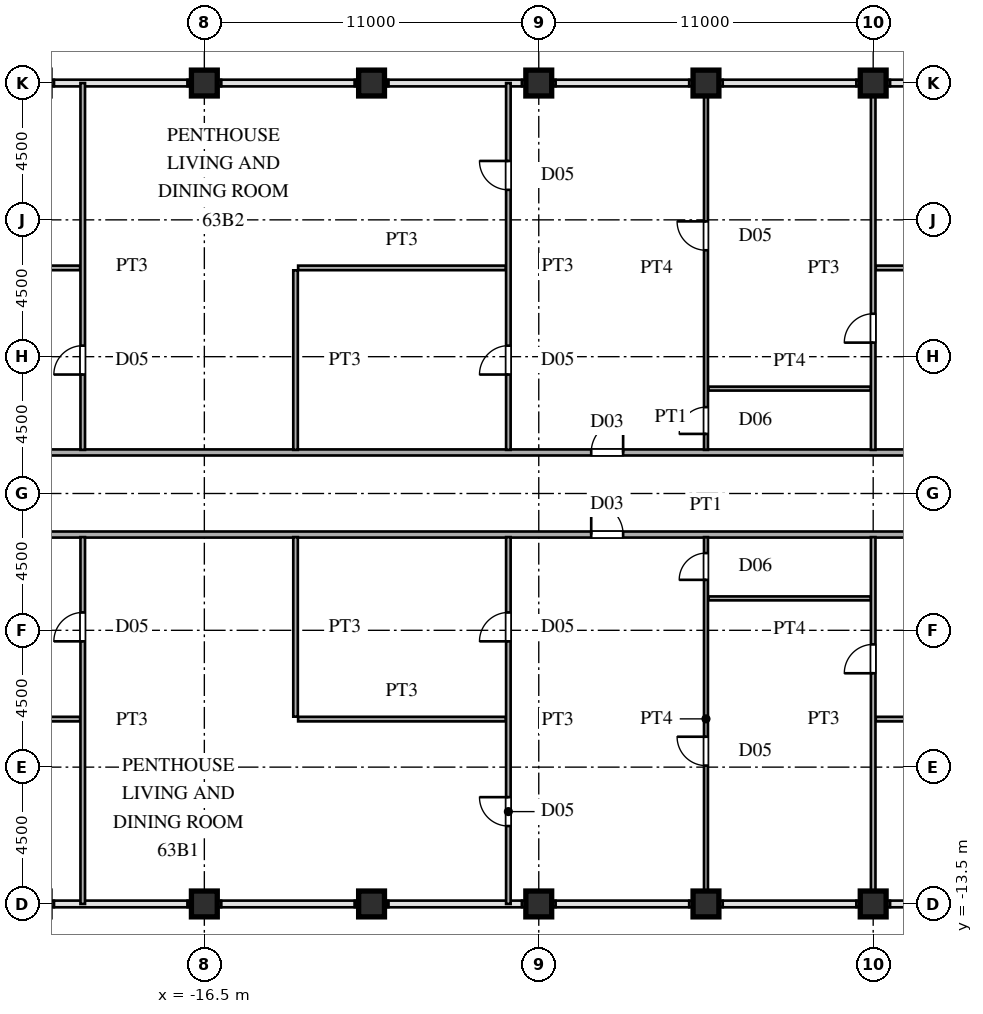
"""IFC4 building model, lengths in metres.
Left out: names, types, materials, properties, quantities, classifications, styles, units other than length and angle.
Written with IfcOpenShell. Run it as: python <this file> out.ifc"""

import sys

from ifc_helpers import new_model, si_unit, direction, frame, frame_2d, origin, origin_2d, place, context, subcontext, project, spatial, rectangle, hollow_rectangle, extrude, source, transform, mapped, element, fill, save


model = new_model("IFC4")
c1 = context("Model", 3, precision=1e-05, world=origin(), true_north=direction((0.0, 1.0)))
c2 = subcontext(c1, "Body", "Model", "MODEL_VIEW")
j1 = project(units=[si_unit("LENGTHUNIT", "METRE"), si_unit("PLANEANGLEUNIT", "RADIAN")], contexts=[c1])
p1 = place(None, origin())
s1 = spatial("IfcSite", under=j1, at=p1, CompositionType="ELEMENT")
p2 = place(p1, origin())
s2 = spatial("IfcBuilding", under=s1, at=p2, CompositionType="ELEMENT")
p3 = place(p2, frame((0.0, 0.0, 239.4)))
s3 = spatial("IfcBuildingStorey", under=s2, at=p3, CompositionType="ELEMENT", Elevation=239.4)
m1 = source(origin(), c2, "Body", "SweptSolid", [
    extrude(hollow_rectangle(XDim=0.85, YDim=0.85, WallThickness=0.036, at=origin_2d()), origin(), (0.0, 0.0, 1.0), 3.75),
])
for number, where, z_axis, x_axis in (
    (1, (-16.5, -13.5, 0.0), (0.0, 0.0, 1.0), (1.0, 0.0, 0.0)),
    (2, (-16.5, 13.5, 0.0), (0.0, 0.0, 1.0), (1.0, 0.0, 0.0)),
    (3, (-11.0, -13.5, 0.0), (0.0, 0.0, 1.0), (1.0, 0.0, 0.0)),
    (4, (-11.0, 13.5, 0.0), (0.0, 0.0, 1.0), (1.0, 0.0, 0.0)),
    (5, (-5.5, -13.5, 0.0), (0.0, 0.0, 1.0), (1.0, 0.0, 0.0)),
    (6, (-5.5, 13.5, 0.0), (0.0, 0.0, 1.0), (1.0, 0.0, 0.0)),
    (7, (0.0, -13.5, 0.0), (0.0, 0.0, 1.0), (1.0, 0.0, 0.0)),
    (8, (0.0, 13.5, 0.0), (0.0, 0.0, 1.0), (1.0, 0.0, 0.0)),
    (9, (5.5, -13.5, 0.0), (0.0, 0.0, 1.0), (1.0, 0.0, 0.0)),
    (10, (5.5, 13.5, 0.0), (0.0, 0.0, 1.0), (1.0, 0.0, 0.0)),
):
    element("IfcColumn", number, at=place(p3, frame(where, z_axis=z_axis, x_axis=x_axis)), inside=s3, PredefinedType="COLUMN", context=c2, shape_type="MappedRepresentation", body=[
        mapped(m1, transform((0.0, 0.0, 0.0), scale=1.0)),
    ])
for number, where, z_axis, x_axis in (
    (11, (-22.55, -13.5, 0.0), (0.0, 0.0, 1.0), (1.0, 0.0, 0.0)),
    (12, (-22.55, 13.5, 0.0), (0.0, 0.0, 1.0), (1.0, 0.0, 0.0)),
    (13, (-17.05, -13.5, 0.0), (0.0, 0.0, 1.0), (1.0, 0.0, 0.0)),
    (14, (-17.05, 13.5, 0.0), (0.0, 0.0, 1.0), (1.0, 0.0, 0.0)),
    (15, (-11.55, -13.5, 0.0), (0.0, 0.0, 1.0), (1.0, 0.0, 0.0)),
    (16, (-11.55, 13.5, 0.0), (0.0, 0.0, 1.0), (1.0, 0.0, 0.0)),
    (17, (-6.05, -13.5, 0.0), (0.0, 0.0, 1.0), (1.0, 0.0, 0.0)),
    (18, (-6.05, 13.5, 0.0), (0.0, 0.0, 1.0), (1.0, 0.0, 0.0)),
    (19, (-0.55, -13.5, 0.0), (0.0, 0.0, 1.0), (1.0, 0.0, 0.0)),
    (20, (-0.55, 13.5, 0.0), (0.0, 0.0, 1.0), (1.0, 0.0, 0.0)),
    (21, (4.95, -13.5, 0.0), (0.0, 0.0, 1.0), (1.0, 0.0, 0.0)),
    (22, (4.95, 13.5, 0.0), (0.0, 0.0, 1.0), (1.0, 0.0, 0.0)),
):
    element("IfcWall", number, at=place(p3, frame(where, z_axis=z_axis, x_axis=x_axis)), inside=s3, PredefinedType="SOLIDWALL", context=c2, shape_type="SweptSolid", body=[
        extrude(rectangle(XDim=1.1, YDim=0.21, at=frame_2d((0.55, 0.0))), origin(), (0.0, 0.0, 1.0), 3.03),
    ])
p4 = place(p3, frame((-27.245, -7.42, 0.0), z_axis=(0.0, 0.0, 1.0), x_axis=(1.0, 0.0, 0.0)))
e23 = element("IfcWall", 23, at=p4, inside=s3, PredefinedType="PARTITIONING", context=c2, shape_type="SweptSolid", body=[
    extrude(rectangle(XDim=6.66, YDim=0.15, at=frame_2d((3.33, 0.0))), origin(), (0.0, 0.0, 1.0), 3.53),
])
p5 = place(p4, frame((3.07, 0.0, 0.0)))
e24 = element("IfcOpeningElement", 24, at=p5, cuts=e23, PredefinedType="OPENING", context=c2, shape_type="SweptSolid", body=[
    extrude(rectangle(XDim=0.95, YDim=2.15, at=frame_2d((0.475, 1.075))), frame((0.0, 0.085, 0.0), z_axis=(0.0, -1.0, 0.0), x_axis=(1.0, 0.0, 0.0)), (0.0, 0.0, 1.0), 0.17),
])
p6 = place(p3, frame((-13.415, -7.42, 0.0), z_axis=(0.0, 0.0, 1.0), x_axis=(1.0, 0.0, 0.0)))
e25 = element("IfcWall", 25, at=p6, inside=s3, PredefinedType="PARTITIONING", context=c2, shape_type="SweptSolid", body=[
    extrude(rectangle(XDim=6.83, YDim=0.15, at=frame_2d((3.415, 0.0))), origin(), (0.0, 0.0, 1.0), 3.53),
])
p7 = place(p3, frame((5.585, -7.42, 0.0), z_axis=(0.0, 0.0, 1.0), x_axis=(1.0, 0.0, 0.0)))
e26 = element("IfcWall", 26, at=p7, inside=s3, PredefinedType="PARTITIONING", context=c2, shape_type="SweptSolid", body=[
    extrude(rectangle(XDim=21.66, YDim=0.15, at=frame_2d((10.83, 0.0))), origin(), (0.0, 0.0, 1.0), 3.53),
])
p8 = place(p7, frame((3.94, 0.0, 0.0)))
e27 = element("IfcOpeningElement", 27, at=p8, cuts=e26, PredefinedType="OPENING", context=c2, shape_type="SweptSolid", body=[
    extrude(rectangle(XDim=0.95, YDim=2.15, at=frame_2d((0.475, 1.075))), frame((0.0, 0.085, 0.0), z_axis=(0.0, -1.0, 0.0), x_axis=(1.0, 0.0, 0.0)), (0.0, 0.0, 1.0), 0.17),
])
p9 = place(p7, frame((11.69, 0.0, 0.0)))
e28 = element("IfcOpeningElement", 28, at=p9, cuts=e26, PredefinedType="OPENING", context=c2, shape_type="SweptSolid", body=[
    extrude(rectangle(XDim=0.95, YDim=2.15, at=frame_2d((0.475, 1.075))), frame((0.0, 0.085, 0.0), z_axis=(0.0, -1.0, 0.0), x_axis=(1.0, 0.0, 0.0)), (0.0, 0.0, 1.0), 0.17),
])
p10 = place(p7, frame((18.19, 0.0, 0.0)))
e29 = element("IfcOpeningElement", 29, at=p10, cuts=e26, PredefinedType="OPENING", context=c2, shape_type="SweptSolid", body=[
    extrude(rectangle(XDim=0.95, YDim=2.15, at=frame_2d((0.475, 1.075))), frame((0.0, 0.085, 0.0), z_axis=(0.0, -1.0, 0.0), x_axis=(1.0, 0.0, 0.0)), (0.0, 0.0, 1.0), 0.17),
])
p11 = place(p3, frame((0.085, -3.45, 0.0), z_axis=(0.0, 0.0, 1.0), x_axis=(1.0, 0.0, 0.0)))
e30 = element("IfcWall", 30, at=p11, inside=s3, PredefinedType="PARTITIONING", context=c2, shape_type="SweptSolid", body=[
    extrude(rectangle(XDim=5.33, YDim=0.13, at=frame_2d((2.665, 0.0))), origin(), (0.0, 0.0, 1.0), 3.53),
])
p12 = place(p3, frame((-27.245, -1.35, 0.0), z_axis=(0.0, 0.0, 1.0), x_axis=(1.0, 0.0, 0.0)))
e31 = element("IfcWall", 31, at=p12, inside=s3, PredefinedType="PARTITIONING", context=c2, shape_type="SweptSolid", body=[
    extrude(rectangle(XDim=54.49, YDim=0.2, at=frame_2d((27.245, 0.0))), origin(), (0.0, 0.0, 1.0), 3.53),
])
p13 = place(p12, frame((23.47, 0.0, 0.0)))
e32 = element("IfcOpeningElement", 32, at=p13, cuts=e31, PredefinedType="OPENING", context=c2, shape_type="SweptSolid", body=[
    extrude(rectangle(XDim=1.05, YDim=2.25, at=frame_2d((0.525, 1.125))), frame((0.0, 0.11, 0.0), z_axis=(0.0, -1.0, 0.0), x_axis=(1.0, 0.0, 0.0)), (0.0, 0.0, 1.0), 0.22),
])
p14 = place(p3, frame((-27.245, 1.35, 0.0), z_axis=(0.0, 0.0, 1.0), x_axis=(1.0, 0.0, 0.0)))
e33 = element("IfcWall", 33, at=p14, inside=s3, PredefinedType="PARTITIONING", context=c2, shape_type="SweptSolid", body=[
    extrude(rectangle(XDim=54.49, YDim=0.2, at=frame_2d((27.245, 0.0))), origin(), (0.0, 0.0, 1.0), 3.53),
])
p15 = place(p14, frame((23.47, 0.0, 0.0)))
e34 = element("IfcOpeningElement", 34, at=p15, cuts=e33, PredefinedType="OPENING", context=c2, shape_type="SweptSolid", body=[
    extrude(rectangle(XDim=1.05, YDim=2.25, at=frame_2d((0.525, 1.125))), frame((0.0, 0.11, 0.0), z_axis=(0.0, -1.0, 0.0), x_axis=(1.0, 0.0, 0.0)), (0.0, 0.0, 1.0), 0.22),
])
p16 = place(p3, frame((0.085, 3.45, 0.0), z_axis=(0.0, 0.0, 1.0), x_axis=(1.0, 0.0, 0.0)))
e35 = element("IfcWall", 35, at=p16, inside=s3, PredefinedType="PARTITIONING", context=c2, shape_type="SweptSolid", body=[
    extrude(rectangle(XDim=5.33, YDim=0.13, at=frame_2d((2.665, 0.0))), origin(), (0.0, 0.0, 1.0), 3.53),
])
p17 = place(p3, frame((-27.245, 7.42, 0.0), z_axis=(0.0, 0.0, 1.0), x_axis=(1.0, 0.0, 0.0)))
e36 = element("IfcWall", 36, at=p17, inside=s3, PredefinedType="PARTITIONING", context=c2, shape_type="SweptSolid", body=[
    extrude(rectangle(XDim=6.66, YDim=0.15, at=frame_2d((3.33, 0.0))), origin(), (0.0, 0.0, 1.0), 3.53),
])
p18 = place(p17, frame((3.07, 0.0, 0.0)))
e37 = element("IfcOpeningElement", 37, at=p18, cuts=e36, PredefinedType="OPENING", context=c2, shape_type="SweptSolid", body=[
    extrude(rectangle(XDim=0.95, YDim=2.15, at=frame_2d((0.475, 1.075))), frame((0.0, 0.085, 0.0), z_axis=(0.0, -1.0, 0.0), x_axis=(1.0, 0.0, 0.0)), (0.0, 0.0, 1.0), 0.17),
])
p19 = place(p3, frame((-13.415, 7.42, 0.0), z_axis=(0.0, 0.0, 1.0), x_axis=(1.0, 0.0, 0.0)))
e38 = element("IfcWall", 38, at=p19, inside=s3, PredefinedType="PARTITIONING", context=c2, shape_type="SweptSolid", body=[
    extrude(rectangle(XDim=6.83, YDim=0.15, at=frame_2d((3.415, 0.0))), origin(), (0.0, 0.0, 1.0), 3.53),
])
p20 = place(p3, frame((5.585, 7.42, 0.0), z_axis=(0.0, 0.0, 1.0), x_axis=(1.0, 0.0, 0.0)))
e39 = element("IfcWall", 39, at=p20, inside=s3, PredefinedType="PARTITIONING", context=c2, shape_type="SweptSolid", body=[
    extrude(rectangle(XDim=21.66, YDim=0.15, at=frame_2d((10.83, 0.0))), origin(), (0.0, 0.0, 1.0), 3.53),
])
p21 = place(p20, frame((3.94, 0.0, 0.0)))
e40 = element("IfcOpeningElement", 40, at=p21, cuts=e39, PredefinedType="OPENING", context=c2, shape_type="SweptSolid", body=[
    extrude(rectangle(XDim=0.95, YDim=2.15, at=frame_2d((0.475, 1.075))), frame((0.0, 0.085, 0.0), z_axis=(0.0, -1.0, 0.0), x_axis=(1.0, 0.0, 0.0)), (0.0, 0.0, 1.0), 0.17),
])
p22 = place(p20, frame((11.69, 0.0, 0.0)))
e41 = element("IfcOpeningElement", 41, at=p22, cuts=e39, PredefinedType="OPENING", context=c2, shape_type="SweptSolid", body=[
    extrude(rectangle(XDim=0.95, YDim=2.15, at=frame_2d((0.475, 1.075))), frame((0.0, 0.085, 0.0), z_axis=(0.0, -1.0, 0.0), x_axis=(1.0, 0.0, 0.0)), (0.0, 0.0, 1.0), 0.17),
])
p23 = place(p20, frame((18.19, 0.0, 0.0)))
e42 = element("IfcOpeningElement", 42, at=p23, cuts=e39, PredefinedType="OPENING", context=c2, shape_type="SweptSolid", body=[
    extrude(rectangle(XDim=0.95, YDim=2.15, at=frame_2d((0.475, 1.075))), frame((0.0, 0.085, 0.0), z_axis=(0.0, -1.0, 0.0), x_axis=(1.0, 0.0, 0.0)), (0.0, 0.0, 1.0), 0.17),
])
p24 = place(p3, frame((-20.5, -13.5, 0.0), z_axis=(0.0, 0.0, 1.0), x_axis=(0.0, 1.0, 0.0)))
e43 = element("IfcWall", 43, at=p24, inside=s3, PredefinedType="PARTITIONING", context=c2, shape_type="SweptSolid", body=[
    extrude(rectangle(XDim=12.065, YDim=0.15, at=frame_2d((6.032, 0.0))), origin(), (0.0, 0.0, 1.0), 3.53),
])
p25 = place(p24, frame((8.637, 0.0, 0.0)))
e44 = element("IfcOpeningElement", 44, at=p25, cuts=e43, PredefinedType="OPENING", context=c2, shape_type="SweptSolid", body=[
    extrude(rectangle(XDim=0.95, YDim=2.15, at=frame_2d((0.475, 1.075))), frame((0.0, 0.085, 0.0), z_axis=(0.0, -1.0, 0.0), x_axis=(1.0, 0.0, 0.0)), (0.0, 0.0, 1.0), 0.17),
])
p26 = place(p3, frame((-20.5, 1.435, 0.0), z_axis=(0.0, 0.0, 1.0), x_axis=(0.0, 1.0, 0.0)))
e45 = element("IfcWall", 45, at=p26, inside=s3, PredefinedType="PARTITIONING", context=c2, shape_type="SweptSolid", body=[
    extrude(rectangle(XDim=12.065, YDim=0.15, at=frame_2d((6.032, 0.0))), origin(), (0.0, 0.0, 1.0), 3.53),
])
p27 = place(p26, frame((2.478, 0.0, 0.0)))
e46 = element("IfcOpeningElement", 46, at=p27, cuts=e45, PredefinedType="OPENING", context=c2, shape_type="SweptSolid", body=[
    extrude(rectangle(XDim=0.95, YDim=2.15, at=frame_2d((0.475, 1.075))), frame((0.0, 0.085, 0.0), z_axis=(0.0, -1.0, 0.0), x_axis=(1.0, 0.0, 0.0)), (0.0, 0.0, 1.0), 0.17),
])
for number, where, z_axis, x_axis in (
    (47, (-13.5, -7.34, 0.0), (0.0, 0.0, 1.0), (0.0, 1.0, 0.0)),
    (48, (-13.5, 1.435, 0.0), (0.0, 0.0, 1.0), (0.0, 1.0, 0.0)),
):
    element("IfcWall", number, at=place(p3, frame(where, z_axis=z_axis, x_axis=x_axis)), inside=s3, PredefinedType="PARTITIONING", context=c2, shape_type="SweptSolid", body=[
        extrude(rectangle(XDim=5.905, YDim=0.15, at=frame_2d((2.953, 0.0))), origin(), (0.0, 0.0, 1.0), 3.53),
    ])
p28 = place(p3, frame((-6.5, -13.5, 0.0), z_axis=(0.0, 0.0, 1.0), x_axis=(0.0, 1.0, 0.0)))
e49 = element("IfcWall", 49, at=p28, inside=s3, PredefinedType="PARTITIONING", context=c2, shape_type="SweptSolid", body=[
    extrude(rectangle(XDim=12.065, YDim=0.15, at=frame_2d((6.032, 0.0))), origin(), (0.0, 0.0, 1.0), 3.53),
])
p29 = place(p28, frame((8.637, 0.0, 0.0)))
e50 = element("IfcOpeningElement", 50, at=p29, cuts=e49, PredefinedType="OPENING", context=c2, shape_type="SweptSolid", body=[
    extrude(rectangle(XDim=0.95, YDim=2.15, at=frame_2d((0.475, 1.075))), frame((0.0, 0.085, 0.0), z_axis=(0.0, -1.0, 0.0), x_axis=(1.0, 0.0, 0.0)), (0.0, 0.0, 1.0), 0.17),
])
p30 = place(p28, frame((2.562, 0.0, 0.0)))
e51 = element("IfcOpeningElement", 51, at=p30, cuts=e49, PredefinedType="OPENING", context=c2, shape_type="SweptSolid", body=[
    extrude(rectangle(XDim=0.95, YDim=2.15, at=frame_2d((0.475, 1.075))), frame((0.0, 0.085, 0.0), z_axis=(0.0, -1.0, 0.0), x_axis=(1.0, 0.0, 0.0)), (0.0, 0.0, 1.0), 0.17),
])
p31 = place(p3, frame((-6.5, 1.435, 0.0), z_axis=(0.0, 0.0, 1.0), x_axis=(0.0, 1.0, 0.0)))
e52 = element("IfcWall", 52, at=p31, inside=s3, PredefinedType="PARTITIONING", context=c2, shape_type="SweptSolid", body=[
    extrude(rectangle(XDim=12.065, YDim=0.15, at=frame_2d((6.032, 0.0))), origin(), (0.0, 0.0, 1.0), 3.53),
])
p32 = place(p31, frame((2.478, 0.0, 0.0)))
e53 = element("IfcOpeningElement", 53, at=p32, cuts=e52, PredefinedType="OPENING", context=c2, shape_type="SweptSolid", body=[
    extrude(rectangle(XDim=0.95, YDim=2.15, at=frame_2d((0.475, 1.075))), frame((0.0, 0.085, 0.0), z_axis=(0.0, -1.0, 0.0), x_axis=(1.0, 0.0, 0.0)), (0.0, 0.0, 1.0), 0.17),
])
p33 = place(p31, frame((8.552, 0.0, 0.0)))
e54 = element("IfcOpeningElement", 54, at=p33, cuts=e52, PredefinedType="OPENING", context=c2, shape_type="SweptSolid", body=[
    extrude(rectangle(XDim=0.95, YDim=2.15, at=frame_2d((0.475, 1.075))), frame((0.0, 0.085, 0.0), z_axis=(0.0, -1.0, 0.0), x_axis=(1.0, 0.0, 0.0)), (0.0, 0.0, 1.0), 0.17),
])
p34 = place(p3, frame((0.0, -13.39, 0.0), z_axis=(0.0, 0.0, 1.0), x_axis=(0.0, 1.0, 0.0)))
e55 = element("IfcWall", 55, at=p34, inside=s3, PredefinedType="PARTITIONING", context=c2, shape_type="SweptSolid", body=[
    extrude(rectangle(XDim=11.955, YDim=0.13, at=frame_2d((5.978, 0.0))), origin(), (0.0, 0.0, 1.0), 2.43),
])
p35 = place(p34, frame((10.55, 0.0, 0.0)))
e56 = element("IfcOpeningElement", 56, at=p35, cuts=e55, PredefinedType="OPENING", context=c2, shape_type="SweptSolid", body=[
    extrude(rectangle(XDim=0.88, YDim=2.1, at=frame_2d((0.44, 1.05))), frame((0.0, 0.075, 0.0), z_axis=(0.0, -1.0, 0.0), x_axis=(1.0, 0.0, 0.0)), (0.0, 0.0, 1.0), 0.15),
])
p36 = place(p34, frame((4.44, 0.0, 0.0)))
e57 = element("IfcOpeningElement", 57, at=p36, cuts=e55, PredefinedType="OPENING", context=c2, shape_type="SweptSolid", body=[
    extrude(rectangle(XDim=0.95, YDim=2.15, at=frame_2d((0.475, 1.075))), frame((0.0, 0.075, 0.0), z_axis=(0.0, -1.0, 0.0), x_axis=(1.0, 0.0, 0.0)), (0.0, 0.0, 1.0), 0.15),
])
p37 = place(p3, frame((0.0, 1.435, 0.0), z_axis=(0.0, 0.0, 1.0), x_axis=(0.0, 1.0, 0.0)))
e58 = element("IfcWall", 58, at=p37, inside=s3, PredefinedType="PARTITIONING", context=c2, shape_type="SweptSolid", body=[
    extrude(rectangle(XDim=11.955, YDim=0.13, at=frame_2d((5.978, 0.0))), origin(), (0.0, 0.0, 1.0), 2.43),
])
p38 = place(p37, frame((0.525, 0.0, 0.0)))
e59 = element("IfcOpeningElement", 59, at=p38, cuts=e58, PredefinedType="OPENING", context=c2, shape_type="SweptSolid", body=[
    extrude(rectangle(XDim=0.88, YDim=2.1, at=frame_2d((0.44, 1.05))), frame((0.0, 0.075, 0.0), z_axis=(0.0, -1.0, 0.0), x_axis=(1.0, 0.0, 0.0)), (0.0, 0.0, 1.0), 0.15),
])
p39 = place(p37, frame((6.565, 0.0, 0.0)))
e60 = element("IfcOpeningElement", 60, at=p39, cuts=e58, PredefinedType="OPENING", context=c2, shape_type="SweptSolid", body=[
    extrude(rectangle(XDim=0.95, YDim=2.15, at=frame_2d((0.475, 1.075))), frame((0.0, 0.075, 0.0), z_axis=(0.0, -1.0, 0.0), x_axis=(1.0, 0.0, 0.0)), (0.0, 0.0, 1.0), 0.15),
])
p40 = place(p3, frame((5.5, -13.39, 0.0), z_axis=(0.0, 0.0, 1.0), x_axis=(0.0, 1.0, 0.0)))
e61 = element("IfcWall", 61, at=p40, inside=s3, PredefinedType="PARTITIONING", context=c2, shape_type="SweptSolid", body=[
    extrude(rectangle(XDim=11.955, YDim=0.15, at=frame_2d((5.978, 0.0))), origin(), (0.0, 0.0, 1.0), 2.43),
])
p41 = place(p40, frame((7.478, 0.0, 0.0)))
e62 = element("IfcOpeningElement", 62, at=p41, cuts=e61, PredefinedType="OPENING", context=c2, shape_type="SweptSolid", body=[
    extrude(rectangle(XDim=0.95, YDim=2.15, at=frame_2d((0.475, 1.075))), frame((0.0, 0.085, 0.0), z_axis=(0.0, -1.0, 0.0), x_axis=(1.0, 0.0, 0.0)), (0.0, 0.0, 1.0), 0.17),
])
p42 = place(p3, frame((5.5, 1.435, 0.0), z_axis=(0.0, 0.0, 1.0), x_axis=(0.0, 1.0, 0.0)))
e63 = element("IfcWall", 63, at=p42, inside=s3, PredefinedType="PARTITIONING", context=c2, shape_type="SweptSolid", body=[
    extrude(rectangle(XDim=11.955, YDim=0.15, at=frame_2d((5.978, 0.0))), origin(), (0.0, 0.0, 1.0), 2.43),
])
p43 = place(p42, frame((3.528, 0.0, 0.0)))
e64 = element("IfcOpeningElement", 64, at=p43, cuts=e63, PredefinedType="OPENING", context=c2, shape_type="SweptSolid", body=[
    extrude(rectangle(XDim=0.95, YDim=2.15, at=frame_2d((0.475, 1.075))), frame((0.0, 0.085, 0.0), z_axis=(0.0, -1.0, 0.0), x_axis=(1.0, 0.0, 0.0)), (0.0, 0.0, 1.0), 0.17),
])
m2 = source(origin(), c2, "Body", "SweptSolid", [
    extrude(rectangle(XDim=1.05, YDim=2.25, at=frame_2d((0.525, 1.125))), frame((0.0, 0.025, 0.0), z_axis=(0.0, -1.0, 0.0), x_axis=(1.0, 0.0, 0.0)), (0.0, 0.0, 1.0), 0.05),
])
p44 = place(p13, origin())
e65 = element("IfcDoor", 65, at=p44, inside=s3, OperationType="SINGLE_SWING_LEFT", PredefinedType="DOOR", context=c2, shape_type="MappedRepresentation", body=[
    mapped(m2, transform((0.0, 0.0, 0.0), scale=1.0)),
])
fill(e32, e65)
p45 = place(p15, origin())
e66 = element("IfcDoor", 66, at=p45, inside=s3, OperationType="SINGLE_SWING_RIGHT", PredefinedType="DOOR", context=c2, shape_type="MappedRepresentation", body=[
    mapped(m2, transform((0.0, 0.0, 0.0), scale=1.0)),
])
fill(e34, e66)
m3 = source(origin(), c2, "Body", "SweptSolid", [
    extrude(rectangle(XDim=0.95, YDim=2.15, at=frame_2d((0.475, 1.075))), frame((0.0, 0.025, 0.0), z_axis=(0.0, -1.0, 0.0), x_axis=(1.0, 0.0, 0.0)), (0.0, 0.0, 1.0), 0.05),
])
p46 = place(p25, origin())
e67 = element("IfcDoor", 67, at=p46, inside=s3, OperationType="SINGLE_SWING_LEFT", PredefinedType="DOOR", context=c2, shape_type="MappedRepresentation", body=[
    mapped(m3, transform((0.0, 0.0, 0.0), scale=1.0)),
])
fill(e44, e67)
p47 = place(p27, origin())
e68 = element("IfcDoor", 68, at=p47, inside=s3, OperationType="SINGLE_SWING_LEFT", PredefinedType="DOOR", context=c2, shape_type="MappedRepresentation", body=[
    mapped(m3, transform((0.0, 0.0, 0.0), scale=1.0)),
])
fill(e46, e68)
p48 = place(p29, origin())
e69 = element("IfcDoor", 69, at=p48, inside=s3, OperationType="SINGLE_SWING_LEFT", PredefinedType="DOOR", context=c2, shape_type="MappedRepresentation", body=[
    mapped(m3, transform((0.0, 0.0, 0.0), scale=1.0)),
])
fill(e50, e69)
p49 = place(p30, origin())
e70 = element("IfcDoor", 70, at=p49, inside=s3, OperationType="SINGLE_SWING_RIGHT", PredefinedType="DOOR", context=c2, shape_type="MappedRepresentation", body=[
    mapped(m3, transform((0.0, 0.0, 0.0), scale=1.0)),
])
fill(e51, e70)
p50 = place(p32, origin())
e71 = element("IfcDoor", 71, at=p50, inside=s3, OperationType="SINGLE_SWING_LEFT", PredefinedType="DOOR", context=c2, shape_type="MappedRepresentation", body=[
    mapped(m3, transform((0.0, 0.0, 0.0), scale=1.0)),
])
fill(e53, e71)
p51 = place(p33, origin())
e72 = element("IfcDoor", 72, at=p51, inside=s3, OperationType="SINGLE_SWING_RIGHT", PredefinedType="DOOR", context=c2, shape_type="MappedRepresentation", body=[
    mapped(m3, transform((0.0, 0.0, 0.0), scale=1.0)),
])
fill(e54, e72)
m4 = source(origin(), c2, "Body", "SweptSolid", [
    extrude(rectangle(XDim=0.88, YDim=2.1, at=frame_2d((0.44, 1.05))), frame((0.0, 0.025, 0.0), z_axis=(0.0, -1.0, 0.0), x_axis=(1.0, 0.0, 0.0)), (0.0, 0.0, 1.0), 0.05),
])
p52 = place(p35, origin())
e73 = element("IfcDoor", 73, at=p52, inside=s3, OperationType="SINGLE_SWING_LEFT", PredefinedType="DOOR", context=c2, shape_type="MappedRepresentation", body=[
    mapped(m4, transform((0.0, 0.0, 0.0), scale=1.0)),
])
fill(e56, e73)
p53 = place(p36, origin())
e74 = element("IfcDoor", 74, at=p53, inside=s3, OperationType="SINGLE_SWING_RIGHT", PredefinedType="DOOR", context=c2, shape_type="MappedRepresentation", body=[
    mapped(m3, transform((0.0, 0.0, 0.0), scale=1.0)),
])
fill(e57, e74)
p54 = place(p38, origin())
e75 = element("IfcDoor", 75, at=p54, inside=s3, OperationType="SINGLE_SWING_LEFT", PredefinedType="DOOR", context=c2, shape_type="MappedRepresentation", body=[
    mapped(m4, transform((0.0, 0.0, 0.0), scale=1.0)),
])
fill(e59, e75)
p55 = place(p39, origin())
e76 = element("IfcDoor", 76, at=p55, inside=s3, OperationType="SINGLE_SWING_RIGHT", PredefinedType="DOOR", context=c2, shape_type="MappedRepresentation", body=[
    mapped(m3, transform((0.0, 0.0, 0.0), scale=1.0)),
])
fill(e60, e76)
p56 = place(p41, origin())
e77 = element("IfcDoor", 77, at=p56, inside=s3, OperationType="SINGLE_SWING_LEFT", PredefinedType="DOOR", context=c2, shape_type="MappedRepresentation", body=[
    mapped(m3, transform((0.0, 0.0, 0.0), scale=1.0)),
])
fill(e62, e77)
p57 = place(p43, origin())
e78 = element("IfcDoor", 78, at=p57, inside=s3, OperationType="SINGLE_SWING_LEFT", PredefinedType="DOOR", context=c2, shape_type="MappedRepresentation", body=[
    mapped(m3, transform((0.0, 0.0, 0.0), scale=1.0)),
])
fill(e64, e78)
save(model, sys.argv[1])
